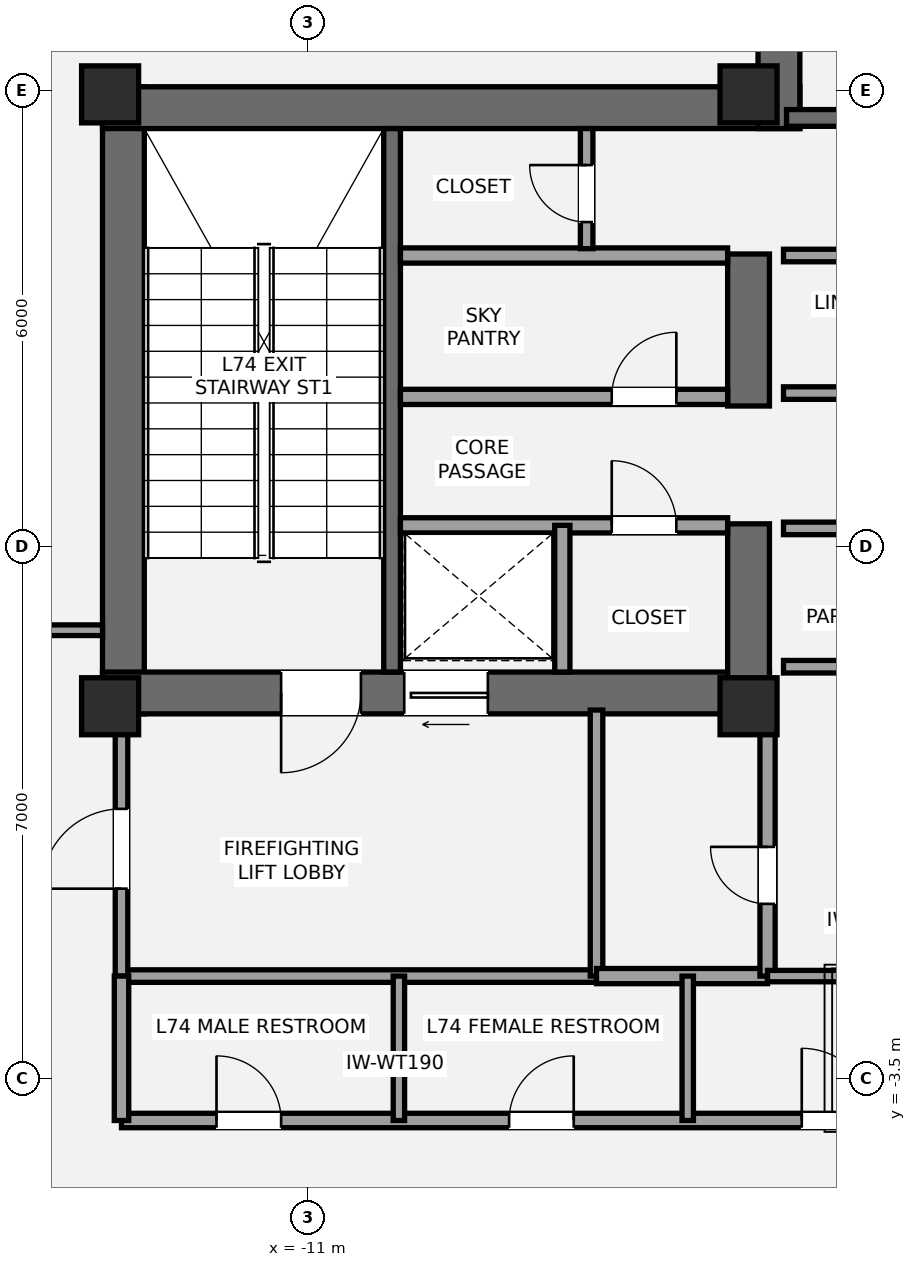
"""IFC4 building model, lengths in metres.
Left out: names, types, materials, properties, quantities, classifications, styles, units other than length and angle.
Written with IfcOpenShell. Run it as: python <this file> out.ifc"""

import sys

from ifc_helpers import new_model, si_unit, direction, frame, frame_2d, origin, origin_2d, place, context, subcontext, project, spatial, rectangle, extrude, element, fill, save


model = new_model("IFC4")
c1 = context("Model", 3, precision=1e-05, world=origin(), true_north=direction((0.0, 1.0)))
c2 = subcontext(c1, "Body", "Model", "MODEL_VIEW")
j1 = project(units=[si_unit("LENGTHUNIT", "METRE"), si_unit("PLANEANGLEUNIT", "RADIAN")], contexts=[c1])
p1 = place(None, origin())
s1 = spatial("IfcSite", under=j1, at=p1, CompositionType="ELEMENT")
p2 = place(p1, origin())
s2 = spatial("IfcBuilding", under=s1, at=p2, CompositionType="ELEMENT")
p3 = place(p2, frame((0.0, 0.0, 260.4)))
s3 = spatial("IfcBuildingStorey", under=s2, at=p3, CompositionType="ELEMENT", Elevation=260.4)
p4 = place(p3, frame((-13.425, 1.3, 0.0), z_axis=(0.0, 0.0, 1.0), x_axis=(0.0, 1.0, 0.0)))
e1 = element("IfcWall", 1, at=p4, inside=s3, PredefinedType="SHEAR", context=c2, shape_type="SweptSolid", body=[
    extrude(rectangle(XDim=8.25, YDim=0.55, at=frame_2d((4.125, 0.0))), origin(), (0.0, 0.0, 1.0), 4.4),
])
p5 = place(p3, frame((-13.7, 9.275, 0.0), z_axis=(0.0, 0.0, 1.0), x_axis=(1.0, 0.0, 0.0)))
e2 = element("IfcWall", 2, at=p5, inside=s3, PredefinedType="SHEAR", context=c2, shape_type="SweptSolid", body=[
    extrude(rectangle(XDim=9.175, YDim=0.55, at=frame_2d((4.587, 0.0))), origin(), (0.0, 0.0, 1.0), 4.4),
])
p6 = place(p3, frame((-4.925, 1.575, 0.0), z_axis=(0.0, 0.0, 1.0), x_axis=(-1.0, 0.0, 0.0)))
e3 = element("IfcWall", 3, at=p6, inside=s3, PredefinedType="SHEAR", context=c2, shape_type="SweptSolid", body=[
    extrude(rectangle(XDim=8.775, YDim=0.55, at=frame_2d((4.387, 0.0))), origin(), (0.0, 0.0, 1.0), 4.4),
])
p7 = place(p6, frame((5.375, 0.0, 0.0)))
e4 = element("IfcOpeningElement", 4, at=p7, cuts=e3, PredefinedType="OPENING", context=c2, shape_type="SweptSolid", body=[
    extrude(rectangle(XDim=1.05, YDim=2.15, at=frame_2d((0.525, 1.075))), frame((0.0, 0.285, 0.0), z_axis=(0.0, -1.0, 0.0), x_axis=(1.0, 0.0, 0.0)), (0.0, 0.0, 1.0), 0.57),
])
p8 = place(p6, frame((3.705, 0.0, 0.0)))
e5 = element("IfcOpeningElement", 5, at=p8, cuts=e3, PredefinedType="OPENING", context=c2, shape_type="SweptSolid", body=[
    extrude(rectangle(XDim=1.1, YDim=2.2, at=frame_2d((0.55, 1.1))), frame((0.0, 0.285, 0.0), z_axis=(0.0, -1.0, 0.0), x_axis=(1.0, 0.0, 0.0)), (0.0, 0.0, 1.0), 0.57),
])
p9 = place(p3, frame((-5.2, 1.3, 0.0), z_axis=(0.0, 0.0, 1.0), x_axis=(0.0, 1.0, 0.0)))
e6 = element("IfcWall", 6, at=p9, inside=s3, PredefinedType="SHEAR", context=c2, shape_type="SweptSolid", body=[
    extrude(rectangle(XDim=2.5, YDim=0.55, at=frame_2d((1.25, 0.0))), origin(), (0.0, 0.0, 1.0), 4.4),
])
p10 = place(p3, frame((-5.2, 5.35, 0.0), z_axis=(0.0, 0.0, 1.0), x_axis=(0.0, 1.0, 0.0)))
e7 = element("IfcWall", 7, at=p10, inside=s3, PredefinedType="SHEAR", context=c2, shape_type="SweptSolid", body=[
    extrude(rectangle(XDim=2.0, YDim=0.55, at=frame_2d((1.0, 0.0))), origin(), (0.0, 0.0, 1.0), 4.4),
])
p11 = place(p3, frame((-9.89, 1.85, 0.0), z_axis=(0.0, 0.0, 1.0), x_axis=(0.0, 1.0, 0.0)))
e8 = element("IfcWall", 8, at=p11, inside=s3, PredefinedType="SHEAR", context=c2, shape_type="SweptSolid", body=[
    extrude(rectangle(XDim=7.15, YDim=0.22, at=frame_2d((3.575, 0.0))), origin(), (0.0, 0.0, 1.0), 4.4),
])
p12 = place(p3, frame((-4.8, 9.0, 0.0), z_axis=(0.0, 0.0, 1.0), x_axis=(0.0, 1.0, 0.0)))
e9 = element("IfcWall", 9, at=p12, inside=s3, PredefinedType="SHEAR", context=c2, shape_type="SweptSolid", body=[
    extrude(rectangle(XDim=3.95, YDim=0.55, at=frame_2d((1.975, 0.0))), origin(), (0.0, 0.0, 1.0), 4.4),
])
p13 = place(p3, frame((-4.7, 9.14, 0.0), z_axis=(0.0, 0.0, 1.0), x_axis=(1.0, 0.0, 0.0)))
e10 = element("IfcWall", 10, at=p13, inside=s3, PredefinedType="SHEAR", context=c2, shape_type="SweptSolid", body=[
    extrude(rectangle(XDim=9.3, YDim=0.22, at=frame_2d((4.65, 0.0))), origin(), (0.0, 0.0, 1.0), 4.4),
])
p14 = place(p13, frame((1.15, 0.0, 0.0)))
e11 = element("IfcOpeningElement", 11, at=p14, cuts=e10, PredefinedType="OPENING", context=c2, shape_type="SweptSolid", body=[
    extrude(rectangle(XDim=1.05, YDim=2.15, at=frame_2d((0.525, 1.075))), frame((0.0, 0.12, 0.0), z_axis=(0.0, -1.0, 0.0), x_axis=(1.0, 0.0, 0.0)), (0.0, 0.0, 1.0), 0.24),
])
for number, where, z_axis, x_axis in (
    (12, (-13.6, 1.4, 0.0), (0.0, 0.0, 1.0), (1.0, 0.0, 0.0)),
    (13, (-13.6, 9.45, 0.0), (0.0, 0.0, 1.0), (1.0, 0.0, 0.0)),
    (14, (-5.2, 1.4, 0.0), (0.0, 0.0, 1.0), (1.0, 0.0, 0.0)),
    (15, (-5.2, 9.45, 0.0), (0.0, 0.0, 1.0), (1.0, 0.0, 0.0)),
):
    element("IfcColumn", number, at=place(p3, frame(where, z_axis=z_axis, x_axis=x_axis)), inside=s3, PredefinedType="PILASTER", context=c2, shape_type="SweptSolid", body=[
        extrude(rectangle(XDim=0.75, YDim=0.75, at=origin_2d()), origin(), (0.0, 0.0, 1.0), 4.4),
    ])
p15 = place(p3, frame((-16.948, 9.316, 0.0), z_axis=(0.0, 0.0, 1.0), x_axis=(0.827739678134, 0.561112310721, 0.0)))
e16 = element("IfcWall", 16, at=p15, inside=s3, PredefinedType="STANDARD", context=c2, shape_type="SweptSolid", body=[
    extrude(rectangle(XDim=3.698, YDim=0.44, at=frame_2d((1.849, 0.0))), origin(), (0.0, 0.0, 1.0), 3.55),
])
p16 = place(p15, frame((0.35, 0.0, 0.58)))
e17 = element("IfcOpeningElement", 17, at=p16, cuts=e16, PredefinedType="OPENING", context=c2, shape_type="SweptSolid", body=[
    extrude(rectangle(XDim=1.4, YDim=1.55, at=frame_2d((0.7, 0.775))), frame((0.0, 0.23, 0.0), z_axis=(0.0, -1.0, 0.0), x_axis=(1.0, 0.0, 0.0)), (0.0, 0.0, 1.0), 0.46),
])
p17 = place(p3, frame((-13.45, -2.15, 0.0), z_axis=(0.0, 0.0, 1.0), x_axis=(1.0, 0.0, 0.0)))
e18 = element("IfcWall", 18, at=p17, inside=s3, PredefinedType="PARTITIONING", context=c2, shape_type="SweptSolid", body=[
    extrude(rectangle(XDim=6.25, YDim=0.165, at=frame_2d((3.125, 0.0))), origin(), (0.0, 0.0, 1.0), 4.18),
])
p18 = place(p3, frame((-13.45, -2.15, 0.0), z_axis=(0.0, 0.0, 1.0), x_axis=(0.0, 1.0, 0.0)))
e19 = element("IfcWall", 19, at=p18, inside=s3, PredefinedType="PARTITIONING", context=c2, shape_type="SweptSolid", body=[
    extrude(rectangle(XDim=3.5, YDim=0.165, at=frame_2d((1.75, 0.0))), origin(), (0.0, 0.0, 1.0), 3.633),
])
p19 = place(p18, frame((1.15, 0.0, 0.0)))
e20 = element("IfcOpeningElement", 20, at=p19, cuts=e19, PredefinedType="OPENING", context=c2, shape_type="SweptSolid", body=[
    extrude(rectangle(XDim=1.05, YDim=2.15, at=frame_2d((0.525, 1.075))), frame((0.0, 0.093, 0.0), z_axis=(0.0, -1.0, 0.0), x_axis=(1.0, 0.0, 0.0)), (0.0, 0.0, 1.0), 0.185),
])
p20 = place(p3, frame((-7.2, -2.15, 0.0), z_axis=(0.0, 0.0, 1.0), x_axis=(0.0, 1.0, 0.0)))
e21 = element("IfcWall", 21, at=p20, inside=s3, PredefinedType="PARTITIONING", context=c2, shape_type="SweptSolid", body=[
    extrude(rectangle(XDim=3.5, YDim=0.165, at=frame_2d((1.75, 0.0))), origin(), (0.0, 0.0, 1.0), 3.633),
])
p21 = place(p3, frame((-7.2, -2.15, 0.0), z_axis=(0.0, 0.0, 1.0), x_axis=(1.0, 0.0, 0.0)))
e22 = element("IfcWall", 22, at=p21, inside=s3, PredefinedType="SOLIDWALL", context=c2, shape_type="SweptSolid", body=[
    extrude(rectangle(XDim=2.25, YDim=0.2, at=frame_2d((1.125, 0.0))), origin(), (0.0, 0.0, 1.0), 4.18),
])
p22 = place(p3, frame((-4.95, -2.15, 0.0), z_axis=(0.0, 0.0, 1.0), x_axis=(0.0, 1.0, 0.0)))
e23 = element("IfcWall", 23, at=p22, inside=s3, PredefinedType="SOLIDWALL", context=c2, shape_type="SweptSolid", body=[
    extrude(rectangle(XDim=3.5, YDim=0.2, at=frame_2d((1.75, 0.0))), origin(), (0.0, 0.0, 1.0), 3.633),
])
p23 = place(p22, frame((0.95, 0.0, 0.0)))
e24 = element("IfcOpeningElement", 24, at=p23, cuts=e23, PredefinedType="OPENING", context=c2, shape_type="SweptSolid", body=[
    extrude(rectangle(XDim=0.75, YDim=2.1, at=frame_2d((0.375, 1.05))), frame((0.0, 0.11, 0.0), z_axis=(0.0, -1.0, 0.0), x_axis=(1.0, 0.0, 0.0)), (0.0, 0.0, 1.0), 0.22),
])
p24 = place(p3, frame((-9.78, 3.78, 0.0), z_axis=(0.0, 0.0, 1.0), x_axis=(1.0, 0.0, 0.0)))
e25 = element("IfcWall", 25, at=p24, inside=s3, PredefinedType="SOLIDWALL", context=c2, shape_type="SweptSolid", body=[
    extrude(rectangle(XDim=4.305, YDim=0.2, at=frame_2d((2.152, 0.0))), origin(), (0.0, 0.0, 1.0), 4.18),
])
p25 = place(p24, frame((2.78, 0.0, 0.0)))
e26 = element("IfcOpeningElement", 26, at=p25, cuts=e25, PredefinedType="OPENING", context=c2, shape_type="SweptSolid", body=[
    extrude(rectangle(XDim=0.85, YDim=2.1, at=frame_2d((0.425, 1.05))), frame((0.0, 0.11, 0.0), z_axis=(0.0, -1.0, 0.0), x_axis=(1.0, 0.0, 0.0)), (0.0, 0.0, 1.0), 0.22),
])
p26 = place(p3, frame((-7.65, 1.85, 0.0), z_axis=(0.0, 0.0, 1.0), x_axis=(0.0, 1.0, 0.0)))
e27 = element("IfcWall", 27, at=p26, inside=s3, PredefinedType="SOLIDWALL", context=c2, shape_type="SweptSolid", body=[
    extrude(rectangle(XDim=1.93, YDim=0.2, at=frame_2d((0.965, 0.0))), origin(), (0.0, 0.0, 1.0), 4.18),
])
p27 = place(p3, frame((-9.78, 5.47, 0.0), z_axis=(0.0, 0.0, 1.0), x_axis=(1.0, 0.0, 0.0)))
e28 = element("IfcWall", 28, at=p27, inside=s3, PredefinedType="SOLIDWALL", context=c2, shape_type="SweptSolid", body=[
    extrude(rectangle(XDim=4.305, YDim=0.2, at=frame_2d((2.152, 0.0))), origin(), (0.0, 0.0, 1.0), 4.18),
])
p28 = place(p27, frame((2.78, 0.0, 0.0)))
e29 = element("IfcOpeningElement", 29, at=p28, cuts=e28, PredefinedType="OPENING", context=c2, shape_type="SweptSolid", body=[
    extrude(rectangle(XDim=0.85, YDim=2.1, at=frame_2d((0.425, 1.05))), frame((0.0, 0.11, 0.0), z_axis=(0.0, -1.0, 0.0), x_axis=(1.0, 0.0, 0.0)), (0.0, 0.0, 1.0), 0.22),
])
p29 = place(p3, frame((-9.78, 7.33, 0.0), z_axis=(0.0, 0.0, 1.0), x_axis=(1.0, 0.0, 0.0)))
e30 = element("IfcWall", 30, at=p29, inside=s3, PredefinedType="SOLIDWALL", context=c2, shape_type="SweptSolid", body=[
    extrude(rectangle(XDim=4.305, YDim=0.2, at=frame_2d((2.152, 0.0))), origin(), (0.0, 0.0, 1.0), 4.18),
])
p30 = place(p3, frame((-4.74, 1.92, 0.0), z_axis=(0.0, 0.0, 1.0), x_axis=(1.0, 0.0, 0.0)))
e31 = element("IfcWall", 31, at=p30, inside=s3, PredefinedType="PARTITIONING", context=c2, shape_type="SweptSolid", body=[
    extrude(rectangle(XDim=3.89, YDim=0.165, at=frame_2d((1.945, 0.0))), origin(), (0.0, 0.0, 1.0), 3.32),
])
p31 = place(p3, frame((-4.74, 3.74, 0.0), z_axis=(0.0, 0.0, 1.0), x_axis=(1.0, 0.0, 0.0)))
e32 = element("IfcWall", 32, at=p31, inside=s3, PredefinedType="PARTITIONING", context=c2, shape_type="SweptSolid", body=[
    extrude(rectangle(XDim=3.89, YDim=0.165, at=frame_2d((1.945, 0.0))), origin(), (0.0, 0.0, 1.0), 4.18),
])
p32 = place(p31, frame((0.75, 0.0, 0.0)))
e33 = element("IfcOpeningElement", 33, at=p32, cuts=e32, PredefinedType="OPENING", context=c2, shape_type="SweptSolid", body=[
    extrude(rectangle(XDim=0.85, YDim=2.1, at=frame_2d((0.425, 1.05))), frame((0.0, 0.093, 0.0), z_axis=(0.0, -1.0, 0.0), x_axis=(1.0, 0.0, 0.0)), (0.0, 0.0, 1.0), 0.185),
])
p33 = place(p31, frame((2.84, 0.0, 0.0)))
e34 = element("IfcOpeningElement", 34, at=p33, cuts=e32, PredefinedType="OPENING", context=c2, shape_type="SweptSolid", body=[
    extrude(rectangle(XDim=0.75, YDim=2.1, at=frame_2d((0.375, 1.05))), frame((0.0, 0.093, 0.0), z_axis=(0.0, -1.0, 0.0), x_axis=(1.0, 0.0, 0.0)), (0.0, 0.0, 1.0), 0.185),
])
p34 = place(p3, frame((-4.74, 5.52, 0.0), z_axis=(0.0, 0.0, 1.0), x_axis=(1.0, 0.0, 0.0)))
e35 = element("IfcWall", 35, at=p34, inside=s3, PredefinedType="PARTITIONING", context=c2, shape_type="SweptSolid", body=[
    extrude(rectangle(XDim=3.89, YDim=0.165, at=frame_2d((1.945, 0.0))), origin(), (0.0, 0.0, 1.0), 4.18),
])
p35 = place(p34, frame((0.75, 0.0, 0.0)))
e36 = element("IfcOpeningElement", 36, at=p35, cuts=e35, PredefinedType="OPENING", context=c2, shape_type="SweptSolid", body=[
    extrude(rectangle(XDim=0.85, YDim=2.1, at=frame_2d((0.425, 1.05))), frame((0.0, 0.093, 0.0), z_axis=(0.0, -1.0, 0.0), x_axis=(1.0, 0.0, 0.0)), (0.0, 0.0, 1.0), 0.185),
])
p36 = place(p34, frame((2.84, 0.0, 0.0)))
e37 = element("IfcOpeningElement", 37, at=p36, cuts=e35, PredefinedType="OPENING", context=c2, shape_type="SweptSolid", body=[
    extrude(rectangle(XDim=0.75, YDim=2.1, at=frame_2d((0.375, 1.05))), frame((0.0, 0.093, 0.0), z_axis=(0.0, -1.0, 0.0), x_axis=(1.0, 0.0, 0.0)), (0.0, 0.0, 1.0), 0.185),
])
p37 = place(p3, frame((-4.74, 7.33, 0.0), z_axis=(0.0, 0.0, 1.0), x_axis=(1.0, 0.0, 0.0)))
e38 = element("IfcWall", 38, at=p37, inside=s3, PredefinedType="PARTITIONING", context=c2, shape_type="SweptSolid", body=[
    extrude(rectangle(XDim=3.89, YDim=0.165, at=frame_2d((1.945, 0.0))), origin(), (0.0, 0.0, 1.0), 4.18),
])
p38 = place(p3, frame((-7.33, 7.42, 0.0), z_axis=(0.0, 0.0, 1.0), x_axis=(0.0, 1.0, 0.0)))
e39 = element("IfcWall", 39, at=p38, inside=s3, PredefinedType="PARTITIONING", context=c2, shape_type="SweptSolid", body=[
    extrude(rectangle(XDim=1.58, YDim=0.165, at=frame_2d((0.79, 0.0))), origin(), (0.0, 0.0, 1.0), 4.18),
])
p39 = place(p38, frame((0.35, 0.0, 0.0)))
e40 = element("IfcOpeningElement", 40, at=p39, cuts=e39, PredefinedType="OPENING", context=c2, shape_type="SweptSolid", body=[
    extrude(rectangle(XDim=0.75, YDim=2.1, at=frame_2d((0.375, 1.05))), frame((0.0, 0.093, 0.0), z_axis=(0.0, -1.0, 0.0), x_axis=(1.0, 0.0, 0.0)), (0.0, 0.0, 1.0), 0.185),
])
p40 = place(p3, frame((-13.45, -4.05, 0.0), z_axis=(0.0, 0.0, 1.0), x_axis=(1.0, 0.0, 0.0)))
e41 = element("IfcWall", 41, at=p40, inside=s3, PredefinedType="PLUMBINGWALL", context=c2, shape_type="SweptSolid", body=[
    extrude(rectangle(XDim=11.35, YDim=0.19, at=frame_2d((5.675, 0.0))), origin(), (0.0, 0.0, 1.0), 3.567),
])
p41 = place(p40, frame((1.25, 0.0, 0.0)))
e42 = element("IfcOpeningElement", 42, at=p41, cuts=e41, PredefinedType="OPENING", context=c2, shape_type="SweptSolid", body=[
    extrude(rectangle(XDim=0.85, YDim=2.1, at=frame_2d((0.425, 1.05))), frame((0.0, 0.105, 0.0), z_axis=(0.0, -1.0, 0.0), x_axis=(1.0, 0.0, 0.0)), (0.0, 0.0, 1.0), 0.21),
])
p42 = place(p40, frame((5.1, 0.0, 0.0)))
e43 = element("IfcOpeningElement", 43, at=p42, cuts=e41, PredefinedType="OPENING", context=c2, shape_type="SweptSolid", body=[
    extrude(rectangle(XDim=0.85, YDim=2.1, at=frame_2d((0.425, 1.05))), frame((0.0, 0.105, 0.0), z_axis=(0.0, -1.0, 0.0), x_axis=(1.0, 0.0, 0.0)), (0.0, 0.0, 1.0), 0.21),
])
p43 = place(p40, frame((8.95, 0.0, 0.0)))
e44 = element("IfcOpeningElement", 44, at=p43, cuts=e41, PredefinedType="OPENING", context=c2, shape_type="SweptSolid", body=[
    extrude(rectangle(XDim=0.95, YDim=2.15, at=frame_2d((0.475, 1.075))), frame((0.0, 0.105, 0.0), z_axis=(0.0, -1.0, 0.0), x_axis=(1.0, 0.0, 0.0)), (0.0, 0.0, 1.0), 0.21),
])
p44 = place(p3, frame((-4.95, -2.15, 0.0), z_axis=(0.0, 0.0, 1.0), x_axis=(1.0, 0.0, 0.0)))
e45 = element("IfcWall", 45, at=p44, inside=s3, PredefinedType="PLUMBINGWALL", context=c2, shape_type="SweptSolid", body=[
    extrude(rectangle(XDim=2.85, YDim=0.15, at=frame_2d((1.425, 0.0))), origin(), (0.0, 0.0, 1.0), 3.633),
])
p45 = place(p3, frame((-13.45, -4.05, 0.0), z_axis=(0.0, 0.0, 1.0), x_axis=(0.0, 1.0, 0.0)))
e46 = element("IfcWall", 46, at=p45, inside=s3, PredefinedType="PLUMBINGWALL", context=c2, shape_type="SweptSolid", body=[
    extrude(rectangle(XDim=1.9, YDim=0.19, at=frame_2d((0.95, 0.0))), origin(), (0.0, 0.0, 1.0), 3.633),
])
p46 = place(p3, frame((-9.8, -4.05, 0.0), z_axis=(0.0, 0.0, 1.0), x_axis=(0.0, 1.0, 0.0)))
e47 = element("IfcWall", 47, at=p46, inside=s3, PredefinedType="PLUMBINGWALL", context=c2, shape_type="SweptSolid", body=[
    extrude(rectangle(XDim=1.9, YDim=0.15, at=frame_2d((0.95, 0.0))), origin(), (0.0, 0.0, 1.0), 4.18),
])
p47 = place(p3, frame((-6.0, -4.05, 0.0), z_axis=(0.0, 0.0, 1.0), x_axis=(0.0, 1.0, 0.0)))
e48 = element("IfcWall", 48, at=p47, inside=s3, PredefinedType="PLUMBINGWALL", context=c2, shape_type="SweptSolid", body=[
    extrude(rectangle(XDim=1.9, YDim=0.15, at=frame_2d((0.95, 0.0))), origin(), (0.0, 0.0, 1.0), 3.641),
])
p48 = place(p3, frame((-15.65, 2.4, 0.0), z_axis=(0.0, 0.0, 1.0), x_axis=(1.0, 0.0, 0.0)))
e49 = element("IfcWall", 49, at=p48, inside=s3, PredefinedType="PARTITIONING", context=c2, shape_type="SweptSolid", body=[
    extrude(rectangle(XDim=1.95, YDim=0.14, at=frame_2d((0.975, 0.0))), origin(), (0.0, 0.0, 1.0), 4.18),
])
p49 = place(p48, frame((0.32, 0.0, 0.0)))
e50 = element("IfcOpeningElement", 50, at=p49, cuts=e49, PredefinedType="OPENING", context=c2, shape_type="SweptSolid", body=[
    extrude(rectangle(XDim=0.92, YDim=2.15, at=frame_2d((0.46, 1.075))), frame((0.0, 0.08, 0.0), z_axis=(0.0, -1.0, 0.0), x_axis=(1.0, 0.0, 0.0)), (0.0, 0.0, 1.0), 0.16),
])
p50 = place(p7, origin())
e51 = element("IfcDoor", 51, at=p50, inside=s3, OperationType="SINGLE_SWING_RIGHT", PredefinedType="DOOR", context=c2, shape_type="SweptSolid", body=[
    extrude(rectangle(XDim=1.05, YDim=2.15, at=frame_2d((0.525, 1.075))), frame((0.0, 0.025, 0.0), z_axis=(0.0, -1.0, 0.0), x_axis=(1.0, 0.0, 0.0)), (0.0, 0.0, 1.0), 0.05),
])
fill(e4, e51)
p51 = place(p19, origin())
e52 = element("IfcDoor", 52, at=p51, inside=s3, OperationType="SINGLE_SWING_LEFT", PredefinedType="DOOR", context=c2, shape_type="SweptSolid", body=[
    extrude(rectangle(XDim=1.05, YDim=2.15, at=frame_2d((0.525, 1.075))), frame((0.0, 0.025, 0.0), z_axis=(0.0, -1.0, 0.0), x_axis=(1.0, 0.0, 0.0)), (0.0, 0.0, 1.0), 0.05),
])
fill(e20, e52)
p52 = place(p23, origin())
e53 = element("IfcDoor", 53, at=p52, inside=s3, OperationType="SINGLE_SWING_RIGHT", PredefinedType="DOOR", context=c2, shape_type="SweptSolid", body=[
    extrude(rectangle(XDim=0.75, YDim=2.1, at=frame_2d((0.375, 1.05))), frame((0.0, 0.025, 0.0), z_axis=(0.0, -1.0, 0.0), x_axis=(1.0, 0.0, 0.0)), (0.0, 0.0, 1.0), 0.05),
])
fill(e24, e53)
p53 = place(p8, origin())
e54 = element("IfcDoor", 54, at=p53, inside=s3, OperationType="SLIDING_TO_LEFT", PredefinedType="DOOR", context=c2, shape_type="SweptSolid", body=[
    extrude(rectangle(XDim=1.1, YDim=2.2, at=frame_2d((0.55, 1.1))), frame((0.0, 0.025, 0.0), z_axis=(0.0, -1.0, 0.0), x_axis=(1.0, 0.0, 0.0)), (0.0, 0.0, 1.0), 0.05),
])
fill(e5, e54)
p54 = place(p28, origin())
e55 = element("IfcDoor", 55, at=p54, inside=s3, OperationType="SINGLE_SWING_RIGHT", PredefinedType="DOOR", context=c2, shape_type="SweptSolid", body=[
    extrude(rectangle(XDim=0.85, YDim=2.1, at=frame_2d((0.425, 1.05))), frame((0.0, 0.025, 0.0), z_axis=(0.0, -1.0, 0.0), x_axis=(1.0, 0.0, 0.0)), (0.0, 0.0, 1.0), 0.05),
])
fill(e29, e55)
p55 = place(p25, origin())
e56 = element("IfcDoor", 56, at=p55, inside=s3, OperationType="SINGLE_SWING_LEFT", PredefinedType="DOOR", context=c2, shape_type="SweptSolid", body=[
    extrude(rectangle(XDim=0.85, YDim=2.1, at=frame_2d((0.425, 1.05))), frame((0.0, 0.025, 0.0), z_axis=(0.0, -1.0, 0.0), x_axis=(1.0, 0.0, 0.0)), (0.0, 0.0, 1.0), 0.05),
])
fill(e26, e56)
p56 = place(p39, origin())
e57 = element("IfcDoor", 57, at=p56, inside=s3, OperationType="SINGLE_SWING_RIGHT", PredefinedType="DOOR", context=c2, shape_type="SweptSolid", body=[
    extrude(rectangle(XDim=0.75, YDim=2.1, at=frame_2d((0.375, 1.05))), frame((0.0, 0.025, 0.0), z_axis=(0.0, -1.0, 0.0), x_axis=(1.0, 0.0, 0.0)), (0.0, 0.0, 1.0), 0.05),
])
fill(e40, e57)
p57 = place(p41, origin())
e58 = element("IfcDoor", 58, at=p57, inside=s3, OperationType="SINGLE_SWING_LEFT", PredefinedType="DOOR", context=c2, shape_type="SweptSolid", body=[
    extrude(rectangle(XDim=0.85, YDim=2.1, at=frame_2d((0.425, 1.05))), frame((0.0, 0.025, 0.0), z_axis=(0.0, -1.0, 0.0), x_axis=(1.0, 0.0, 0.0)), (0.0, 0.0, 1.0), 0.05),
])
fill(e42, e58)
p58 = place(p42, origin())
e59 = element("IfcDoor", 59, at=p58, inside=s3, OperationType="SINGLE_SWING_RIGHT", PredefinedType="DOOR", context=c2, shape_type="SweptSolid", body=[
    extrude(rectangle(XDim=0.85, YDim=2.1, at=frame_2d((0.425, 1.05))), frame((0.0, 0.025, 0.0), z_axis=(0.0, -1.0, 0.0), x_axis=(1.0, 0.0, 0.0)), (0.0, 0.0, 1.0), 0.05),
])
fill(e43, e59)
p59 = place(p43, origin())
e60 = element("IfcDoor", 60, at=p59, inside=s3, OperationType="SINGLE_SWING_LEFT", PredefinedType="DOOR", context=c2, shape_type="SweptSolid", body=[
    extrude(rectangle(XDim=0.95, YDim=2.15, at=frame_2d((0.475, 1.075))), frame((0.0, 0.025, 0.0), z_axis=(0.0, -1.0, 0.0), x_axis=(1.0, 0.0, 0.0)), (0.0, 0.0, 1.0), 0.05),
])
fill(e44, e60)
save(model, sys.argv[1])
